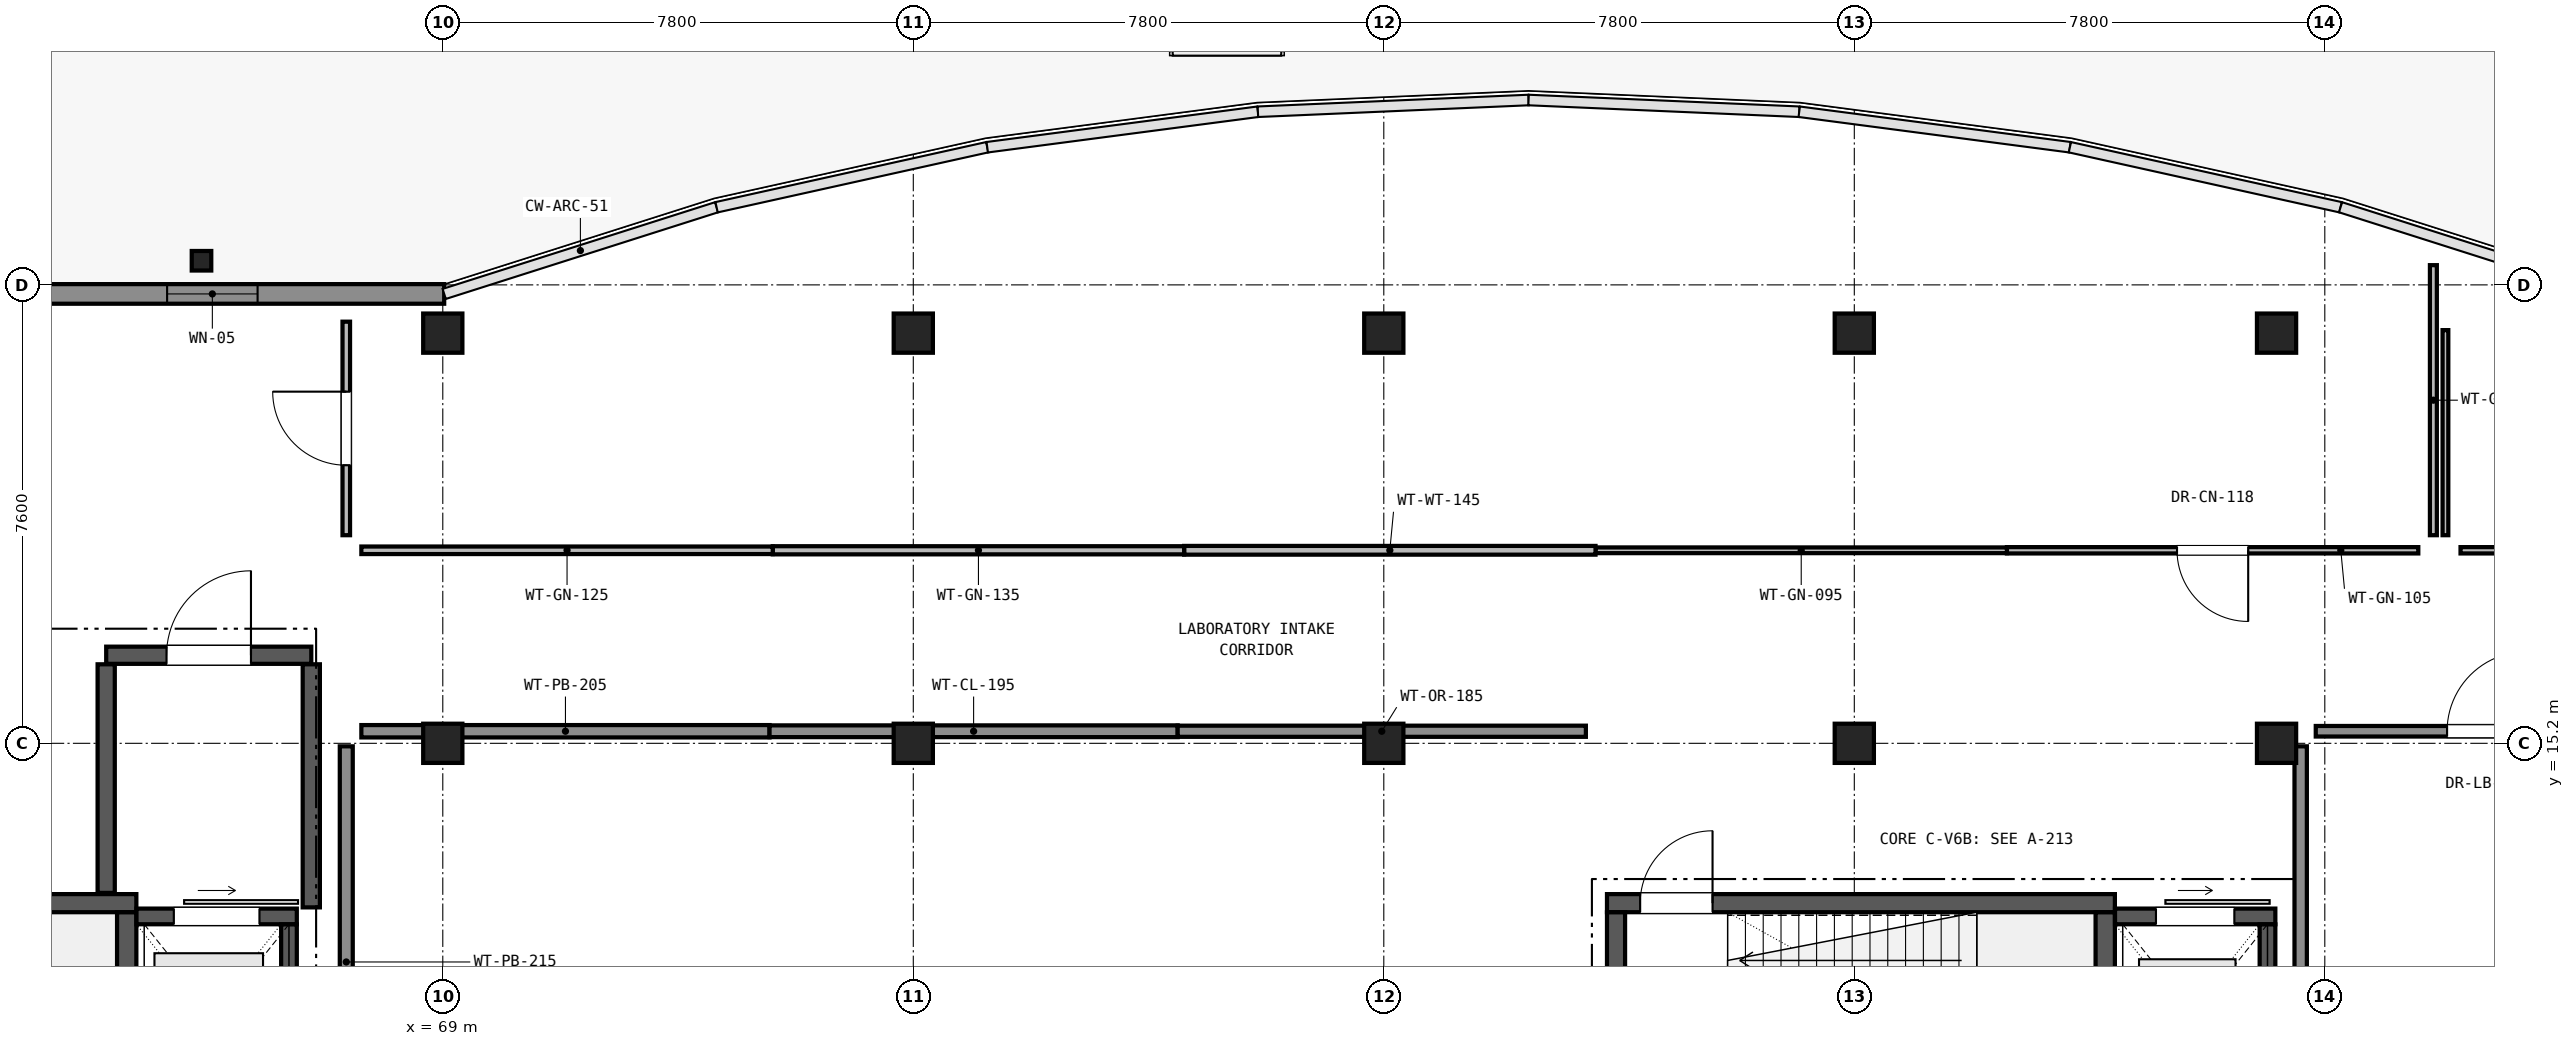
"""IFC4 building model, lengths in metres.
Left out: names, types, materials, properties, quantities, classifications, styles, units other than length and angle.
Written with IfcOpenShell. Run it as: python <this file> out.ifc"""

import sys

from ifc_helpers import new_model, si_unit, direction, frame, frame_2d, origin, origin_2d, place, context, subcontext, project, spatial, rectangle, hollow_circle, extrude, element, fill, save


model = new_model("IFC4")
c1 = context("Model", 3, precision=1e-05, world=origin(), true_north=direction((0.0, 1.0)))
c2 = subcontext(c1, "Body", "Model", "MODEL_VIEW")
j1 = project(units=[si_unit("LENGTHUNIT", "METRE"), si_unit("PLANEANGLEUNIT", "RADIAN")], contexts=[c1])
p1 = place(None, origin())
s1 = spatial("IfcSite", under=j1, at=p1, CompositionType="ELEMENT")
p2 = place(p1, origin())
s2 = spatial("IfcBuilding", under=s1, at=p2, CompositionType="ELEMENT")
p3 = place(p2, origin())
s3 = spatial("IfcBuildingStorey", under=s2, at=p3, CompositionType="ELEMENT", Elevation=0.0)
for number, where, z_axis, x_axis in (
    (1, (69.0, 15.2, 0.0), (0.0, 0.0, 1.0), (1.0, 0.0, 0.0)),
    (2, (69.0, 22.0, 0.0), (0.0, 0.0, 1.0), (1.0, 0.0, 0.0)),
    (3, (76.8, 15.2, 0.0), (0.0, 0.0, 1.0), (1.0, 0.0, 0.0)),
    (4, (76.8, 22.0, 0.0), (0.0, 0.0, 1.0), (1.0, 0.0, 0.0)),
    (5, (84.6, 15.2, 0.0), (0.0, 0.0, 1.0), (1.0, 0.0, 0.0)),
    (6, (84.6, 22.0, 0.0), (0.0, 0.0, 1.0), (1.0, 0.0, 0.0)),
    (7, (92.4, 15.2, 0.0), (0.0, 0.0, 1.0), (1.0, 0.0, 0.0)),
    (8, (92.4, 22.0, 0.0), (0.0, 0.0, 1.0), (1.0, 0.0, 0.0)),
    (9, (99.4, 15.2, 0.0), (0.0, 0.0, 1.0), (1.0, 0.0, 0.0)),
    (10, (99.4, 22.0, 0.0), (0.0, 0.0, 1.0), (1.0, 0.0, 0.0)),
):
    element("IfcColumn", number, at=place(p3, frame(where, z_axis=z_axis, x_axis=x_axis)), inside=s3, PredefinedType="COLUMN", context=c2, shape_type="SweptSolid", body=[
        extrude(rectangle(XDim=0.65, YDim=0.65, at=origin_2d()), origin(), (0.0, 0.0, 1.0), 5.1),
    ])
p4 = place(p3, frame((65.0, 23.2, 0.0), z_axis=(0.0, 0.0, 1.0), x_axis=(1.0, 0.0, 0.0)))
e11 = element("IfcColumn", 11, at=p4, inside=s3, PredefinedType="COLUMN", context=c2, shape_type="SweptSolid", body=[
    extrude(hollow_circle(Radius=0.162, WallThickness=0.012, at=origin_2d()), origin(), (0.0, 0.0, 1.0), 5.1),
])
p5 = place(p3, frame((61.337, 22.65, 0.0), z_axis=(0.0, 0.0, 1.0), x_axis=(1.0, 0.0, 0.0)))
e12 = element("IfcWall", 12, at=p5, inside=s3, PredefinedType="SOLIDWALL", context=c2, shape_type="SweptSolid", body=[
    extrude(rectangle(XDim=7.687, YDim=0.325, at=frame_2d((3.843, 0.0))), origin(), (0.0, 0.0, 1.0), 4.77),
])
p6 = place(p5, frame((3.093, 0.0, 0.9)))
e13 = element("IfcOpeningElement", 13, at=p6, cuts=e12, PredefinedType="OPENING", context=c2, shape_type="SweptSolid", body=[
    extrude(rectangle(XDim=1.5, YDim=1.5, at=frame_2d((0.75, 0.75))), frame((0.0, 0.172, 0.0), z_axis=(0.0, -1.0, 0.0), x_axis=(1.0, 0.0, 0.0)), (0.0, 0.0, 1.0), 0.345),
])
p7 = place(p3, frame((55.5, 12.55, 0.0), z_axis=(0.0, 0.0, 1.0), x_axis=(1.0, 0.0, 0.0)))
e14 = element("IfcWall", 14, at=p7, inside=s3, PredefinedType="SHEAR", context=c2, shape_type="SweptSolid", body=[
    extrude(rectangle(XDim=8.42, YDim=0.3, at=frame_2d((4.21, 0.0))), origin(), (0.0, 0.0, 1.0), 4.77),
])
p8 = place(p7, frame((0.55, 0.0, 0.0)))
e15 = element("IfcOpeningElement", 15, at=p8, cuts=e14, PredefinedType="OPENING", context=c2, shape_type="SweptSolid", body=[
    extrude(rectangle(XDim=1.2, YDim=2.2, at=frame_2d((0.6, 1.1))), frame((0.0, 0.16, 0.0), z_axis=(0.0, -1.0, 0.0), x_axis=(1.0, 0.0, 0.0)), (0.0, 0.0, 1.0), 0.32),
])
p9 = place(p3, frame((63.76, 9.002, 0.0), z_axis=(0.0, 0.0, 1.0), x_axis=(0.0, 1.0, 0.0)))
e16 = element("IfcWall", 16, at=p9, inside=s3, PredefinedType="SHEAR", context=c2, shape_type="SweptSolid", body=[
    extrude(rectangle(XDim=3.396, YDim=0.32, at=frame_2d((1.698, 0.0))), origin(), (0.0, 0.0, 1.0), 4.77),
])
p10 = place(p3, frame((63.922, 12.33, 0.0), z_axis=(0.0, 0.0, 1.0), x_axis=(1.0, 0.0, 0.0)))
e17 = element("IfcWall", 17, at=p10, inside=s3, PredefinedType="SHEAR", context=c2, shape_type="SweptSolid", body=[
    extrude(rectangle(XDim=2.658, YDim=0.26, at=frame_2d((1.329, 0.0))), origin(), (0.0, 0.0, 1.0), 4.77),
])
p11 = place(p10, frame((0.619, 0.0, 0.0)))
e18 = element("IfcOpeningElement", 18, at=p11, cuts=e17, PredefinedType="OPENING", context=c2, shape_type="SweptSolid", body=[
    extrude(rectangle(XDim=1.42, YDim=2.25, at=frame_2d((0.71, 1.125))), frame((0.0, 0.14, 0.0), z_axis=(0.0, -1.0, 0.0), x_axis=(1.0, 0.0, 0.0)), (0.0, 0.0, 1.0), 0.28),
])
p12 = place(p3, frame((66.45, 9.202, 0.0), z_axis=(0.0, 0.0, 1.0), x_axis=(0.0, 1.0, 0.0)))
e19 = element("IfcWall", 19, at=p12, inside=s3, PredefinedType="SHEAR", context=c2, shape_type="SweptSolid", body=[
    extrude(rectangle(XDim=2.996, YDim=0.26, at=frame_2d((1.498, 0.0))), origin(), (0.0, 0.0, 1.0), 4.77),
])
p13 = place(p3, frame((63.42, 16.66, 0.0), z_axis=(0.0, 0.0, 1.0), x_axis=(1.0, 0.0, 0.0)))
e20 = element("IfcWall", 20, at=p13, inside=s3, PredefinedType="SHEAR", context=c2, shape_type="SweptSolid", body=[
    extrude(rectangle(XDim=3.4, YDim=0.285, at=frame_2d((1.7, 0.0))), origin(), (0.0, 0.0, 1.0), 4.77),
])
p14 = place(p13, frame((1.0, 0.0, 0.0)))
e21 = element("IfcOpeningElement", 21, at=p14, cuts=e20, PredefinedType="OPENING", context=c2, shape_type="SweptSolid", body=[
    extrude(rectangle(XDim=1.4, YDim=2.25, at=frame_2d((0.7, 1.125))), frame((0.0, 0.152, 0.0), z_axis=(0.0, -1.0, 0.0), x_axis=(1.0, 0.0, 0.0)), (0.0, 0.0, 1.0), 0.305),
])
p15 = place(p3, frame((63.42, 12.72, 0.0), z_axis=(0.0, 0.0, 1.0), x_axis=(0.0, 1.0, 0.0)))
e22 = element("IfcWall", 22, at=p15, inside=s3, PredefinedType="SHEAR", context=c2, shape_type="SweptSolid", body=[
    extrude(rectangle(XDim=3.79, YDim=0.285, at=frame_2d((1.895, 0.0))), origin(), (0.0, 0.0, 1.0), 4.22),
])
p16 = place(p3, frame((66.82, 12.48, 0.0), z_axis=(0.0, 0.0, 1.0), x_axis=(0.0, 1.0, 0.0)))
e23 = element("IfcWall", 23, at=p16, inside=s3, PredefinedType="SHEAR", context=c2, shape_type="SweptSolid", body=[
    extrude(rectangle(XDim=4.03, YDim=0.285, at=frame_2d((2.015, 0.0))), origin(), (0.0, 0.0, 1.0), 4.22),
])
p17 = place(p3, frame((88.3, 12.55, 0.0), z_axis=(0.0, 0.0, 1.0), x_axis=(1.0, 0.0, 0.0)))
e24 = element("IfcWall", 24, at=p17, inside=s3, PredefinedType="SHEAR", context=c2, shape_type="SweptSolid", body=[
    extrude(rectangle(XDim=8.42, YDim=0.3, at=frame_2d((4.21, 0.0))), origin(), (0.0, 0.0, 1.0), 4.77),
])
p18 = place(p17, frame((0.55, 0.0, 0.0)))
e25 = element("IfcOpeningElement", 25, at=p18, cuts=e24, PredefinedType="OPENING", context=c2, shape_type="SweptSolid", body=[
    extrude(rectangle(XDim=1.2, YDim=2.2, at=frame_2d((0.6, 1.1))), frame((0.0, 0.16, 0.0), z_axis=(0.0, -1.0, 0.0), x_axis=(1.0, 0.0, 0.0)), (0.0, 0.0, 1.0), 0.32),
])
p19 = place(p3, frame((88.45, 9.002, 0.0), z_axis=(0.0, 0.0, 1.0), x_axis=(0.0, 1.0, 0.0)))
e26 = element("IfcWall", 26, at=p19, inside=s3, PredefinedType="SHEAR", context=c2, shape_type="SweptSolid", body=[
    extrude(rectangle(XDim=3.396, YDim=0.3, at=frame_2d((1.698, 0.0))), origin(), (0.0, 0.0, 1.0), 4.77),
])
p20 = place(p3, frame((96.56, 9.002, 0.0), z_axis=(0.0, 0.0, 1.0), x_axis=(0.0, 1.0, 0.0)))
e27 = element("IfcWall", 27, at=p20, inside=s3, PredefinedType="SHEAR", context=c2, shape_type="SweptSolid", body=[
    extrude(rectangle(XDim=3.396, YDim=0.32, at=frame_2d((1.698, 0.0))), origin(), (0.0, 0.0, 1.0), 4.77),
])
p21 = place(p3, frame((96.722, 12.33, 0.0), z_axis=(0.0, 0.0, 1.0), x_axis=(1.0, 0.0, 0.0)))
e28 = element("IfcWall", 28, at=p21, inside=s3, PredefinedType="SHEAR", context=c2, shape_type="SweptSolid", body=[
    extrude(rectangle(XDim=2.658, YDim=0.26, at=frame_2d((1.329, 0.0))), origin(), (0.0, 0.0, 1.0), 4.77),
])
p22 = place(p21, frame((0.679, 0.0, 0.0)))
e29 = element("IfcOpeningElement", 29, at=p22, cuts=e28, PredefinedType="OPENING", context=c2, shape_type="SweptSolid", body=[
    extrude(rectangle(XDim=1.3, YDim=2.2, at=frame_2d((0.65, 1.1))), frame((0.0, 0.14, 0.0), z_axis=(0.0, -1.0, 0.0), x_axis=(1.0, 0.0, 0.0)), (0.0, 0.0, 1.0), 0.28),
])
p23 = place(p3, frame((99.25, 9.202, 0.0), z_axis=(0.0, 0.0, 1.0), x_axis=(0.0, 1.0, 0.0)))
e30 = element("IfcWall", 30, at=p23, inside=s3, PredefinedType="SHEAR", context=c2, shape_type="SweptSolid", body=[
    extrude(rectangle(XDim=2.996, YDim=0.26, at=frame_2d((1.498, 0.0))), origin(), (0.0, 0.0, 1.0), 4.77),
])
p24 = place(p3, frame((67.4, 8.0, 0.0), z_axis=(0.0, 0.0, 1.0), x_axis=(0.0, 1.0, 0.0)))
e31 = element("IfcWall", 31, at=p24, inside=s3, PredefinedType="PARTITIONING", context=c2, shape_type="SweptSolid", body=[
    extrude(rectangle(XDim=7.15, YDim=0.215, at=frame_2d((3.575, 0.0))), origin(), (0.0, 0.0, 1.0), 4.07),
])
p25 = place(p3, frame((67.65, 15.4, 0.0), z_axis=(0.0, 0.0, 1.0), x_axis=(1.0, 0.0, 0.0)))
e32 = element("IfcWall", 32, at=p25, inside=s3, PredefinedType="PARTITIONING", context=c2, shape_type="SweptSolid", body=[
    extrude(rectangle(XDim=6.767, YDim=0.205, at=frame_2d((3.384, 0.0))), origin(), (0.0, 0.0, 1.0), 4.12),
])
p26 = place(p3, frame((74.417, 15.4, 0.0), z_axis=(0.0, 0.0, 1.0), x_axis=(1.0, 0.0, 0.0)))
e33 = element("IfcWall", 33, at=p26, inside=s3, PredefinedType="PARTITIONING", context=c2, shape_type="SweptSolid", body=[
    extrude(rectangle(XDim=6.766, YDim=0.195, at=frame_2d((3.383, 0.0))), origin(), (0.0, 0.0, 1.0), 3.97),
])
p27 = place(p3, frame((81.183, 15.4, 0.0), z_axis=(0.0, 0.0, 1.0), x_axis=(1.0, 0.0, 0.0)))
e34 = element("IfcWall", 34, at=p27, inside=s3, PredefinedType="PARTITIONING", context=c2, shape_type="SweptSolid", body=[
    extrude(rectangle(XDim=6.767, YDim=0.185, at=frame_2d((3.383, 0.0))), origin(), (0.0, 0.0, 1.0), 4.07),
])
p28 = place(p3, frame((67.4, 18.65, 0.0), z_axis=(0.0, 0.0, 1.0), x_axis=(0.0, 1.0, 0.0)))
e35 = element("IfcWall", 35, at=p28, inside=s3, PredefinedType="PARTITIONING", context=c2, shape_type="SweptSolid", body=[
    extrude(rectangle(XDim=3.54, YDim=0.125, at=frame_2d((1.77, 0.0))), origin(), (0.0, 0.0, 1.0), 4.07),
])
p29 = place(p28, frame((1.16, 0.0, 0.0)))
e36 = element("IfcOpeningElement", 36, at=p29, cuts=e35, PredefinedType="OPENING", context=c2, shape_type="SweptSolid", body=[
    extrude(rectangle(XDim=1.22, YDim=2.2, at=frame_2d((0.61, 1.1))), frame((0.0, 0.073, 0.0), z_axis=(0.0, -1.0, 0.0), x_axis=(1.0, 0.0, 0.0)), (0.0, 0.0, 1.0), 0.145),
])
p30 = place(p3, frame((102.0, 23.127, 0.0), z_axis=(0.0, 0.0, 1.0), x_axis=(0.0, -1.0, 0.0)))
e37 = element("IfcWall", 37, at=p30, inside=s3, PredefinedType="PARTITIONING", context=c2, shape_type="SweptSolid", body=[
    extrude(rectangle(XDim=4.477, YDim=0.115, at=frame_2d((2.239, 0.0))), origin(), (0.0, 0.0, 1.0), 4.12),
])
p31 = place(p3, frame((101.75, 18.4, 0.0), z_axis=(0.0, 0.0, 1.0), x_axis=(-1.0, 0.0, 0.0)))
e38 = element("IfcWall", 38, at=p31, inside=s3, PredefinedType="PARTITIONING", context=c2, shape_type="SweptSolid", body=[
    extrude(rectangle(XDim=6.82, YDim=0.105, at=frame_2d((3.41, 0.0))), origin(), (0.0, 0.0, 1.0), 4.22),
])
p32 = place(p31, frame((2.82, 0.0, 0.0)))
e39 = element("IfcOpeningElement", 39, at=p32, cuts=e38, PredefinedType="OPENING", context=c2, shape_type="SweptSolid", body=[
    extrude(rectangle(XDim=1.18, YDim=2.2, at=frame_2d((0.59, 1.1))), frame((0.0, 0.062, 0.0), z_axis=(0.0, -1.0, 0.0), x_axis=(1.0, 0.0, 0.0)), (0.0, 0.0, 1.0), 0.125),
])
p33 = place(p3, frame((94.93, 18.4, 0.0), z_axis=(0.0, 0.0, 1.0), x_axis=(-1.0, 0.0, 0.0)))
e40 = element("IfcWall", 40, at=p33, inside=s3, PredefinedType="PARTITIONING", context=c2, shape_type="SweptSolid", body=[
    extrude(rectangle(XDim=6.82, YDim=0.095, at=frame_2d((3.41, 0.0))), origin(), (0.0, 0.0, 1.0), 4.02),
])
p34 = place(p3, frame((88.11, 18.4, 0.0), z_axis=(0.0, 0.0, 1.0), x_axis=(-1.0, 0.0, 0.0)))
e41 = element("IfcWall", 41, at=p34, inside=s3, PredefinedType="PARTITIONING", context=c2, shape_type="SweptSolid", body=[
    extrude(rectangle(XDim=6.82, YDim=0.145, at=frame_2d((3.41, 0.0))), origin(), (0.0, 0.0, 1.0), 4.12),
])
p35 = place(p3, frame((81.29, 18.4, 0.0), z_axis=(0.0, 0.0, 1.0), x_axis=(-1.0, 0.0, 0.0)))
e42 = element("IfcWall", 42, at=p35, inside=s3, PredefinedType="PARTITIONING", context=c2, shape_type="SweptSolid", body=[
    extrude(rectangle(XDim=6.82, YDim=0.135, at=frame_2d((3.41, 0.0))), origin(), (0.0, 0.0, 1.0), 3.97),
])
p36 = place(p3, frame((74.47, 18.4, 0.0), z_axis=(0.0, 0.0, 1.0), x_axis=(-1.0, 0.0, 0.0)))
e43 = element("IfcWall", 43, at=p36, inside=s3, PredefinedType="PARTITIONING", context=c2, shape_type="SweptSolid", body=[
    extrude(rectangle(XDim=6.82, YDim=0.125, at=frame_2d((3.41, 0.0))), origin(), (0.0, 0.0, 1.0), 4.12),
])
p37 = place(p3, frame((100.05, 15.4, 0.0), z_axis=(0.0, 0.0, 1.0), x_axis=(1.0, 0.0, 0.0)))
e44 = element("IfcWall", 44, at=p37, inside=s3, PredefinedType="PARTITIONING", context=c2, shape_type="SweptSolid", body=[
    extrude(rectangle(XDim=5.675, YDim=0.175, at=frame_2d((2.837, 0.0))), origin(), (0.0, 0.0, 1.0), 3.97),
])
p38 = place(p37, frame((2.177, 0.0, 0.0)))
e45 = element("IfcOpeningElement", 45, at=p38, cuts=e44, PredefinedType="OPENING", context=c2, shape_type="SweptSolid", body=[
    extrude(rectangle(XDim=1.32, YDim=2.2, at=frame_2d((0.66, 1.1))), frame((0.0, 0.097, 0.0), z_axis=(0.0, -1.0, 0.0), x_axis=(1.0, 0.0, 0.0)), (0.0, 0.0, 1.0), 0.195),
])
p39 = place(p3, frame((99.8, 8.0, 0.0), z_axis=(0.0, 0.0, 1.0), x_axis=(0.0, 1.0, 0.0)))
e46 = element("IfcWall", 46, at=p39, inside=s3, PredefinedType="PARTITIONING", context=c2, shape_type="SweptSolid", body=[
    extrude(rectangle(XDim=7.15, YDim=0.205, at=frame_2d((3.575, 0.0))), origin(), (0.0, 0.0, 1.0), 3.97),
])
p40 = place(p3, frame((111.75, 18.4, 0.0), z_axis=(0.0, 0.0, 1.0), x_axis=(-1.0, 0.0, 0.0)))
e47 = element("IfcWall", 47, at=p40, inside=s3, PredefinedType="PARTITIONING", context=c2, shape_type="SweptSolid", body=[
    extrude(rectangle(XDim=9.3, YDim=0.105, at=frame_2d((4.65, 0.0))), origin(), (0.0, 0.0, 1.0), 4.07),
])
p41 = place(p40, frame((4.175, 0.0, 0.0)))
e48 = element("IfcOpeningElement", 48, at=p41, cuts=e47, PredefinedType="OPENING", context=c2, shape_type="SweptSolid", body=[
    extrude(rectangle(XDim=0.95, YDim=2.15, at=frame_2d((0.475, 1.075))), frame((0.0, 0.062, 0.0), z_axis=(0.0, -1.0, 0.0), x_axis=(1.0, 0.0, 0.0)), (0.0, 0.0, 1.0), 0.125),
])
p42 = place(p3, frame((102.2, 18.65, 0.0), z_axis=(0.0, 0.0, 1.0), x_axis=(0.0, 1.0, 0.0)))
e49 = element("IfcWall", 49, at=p42, inside=s3, PredefinedType="PARTITIONING", context=c2, shape_type="SweptSolid", body=[
    extrude(rectangle(XDim=3.4, YDim=0.095, at=frame_2d((1.7, 0.0))), origin(), (0.0, 0.0, 1.0), 4.12),
])
p43 = place(p6, origin())
e50 = element("IfcWindow", 50, at=p43, inside=s3, PartitioningType="SINGLE_PANEL", PredefinedType="WINDOW", context=c2, shape_type="SweptSolid", body=[
    extrude(rectangle(XDim=1.5, YDim=1.5, at=frame_2d((0.75, 0.75))), frame((0.0, 0.03, 0.0), z_axis=(0.0, -1.0, 0.0), x_axis=(1.0, 0.0, 0.0)), (0.0, 0.0, 1.0), 0.06),
])
fill(e13, e50)
p44 = place(p11, origin())
e51 = element("IfcDoor", 51, at=p44, inside=s3, OperationType="SLIDING_TO_RIGHT", PredefinedType="DOOR", context=c2, shape_type="SweptSolid", body=[
    extrude(rectangle(XDim=1.42, YDim=2.25, at=frame_2d((0.71, 1.125))), frame((0.0, 0.025, 0.0), z_axis=(0.0, -1.0, 0.0), x_axis=(1.0, 0.0, 0.0)), (0.0, 0.0, 1.0), 0.05),
])
fill(e18, e51)
p45 = place(p14, origin())
e52 = element("IfcDoor", 52, at=p45, inside=s3, OperationType="SINGLE_SWING_RIGHT", PredefinedType="DOOR", context=c2, shape_type="SweptSolid", body=[
    extrude(rectangle(XDim=1.4, YDim=2.25, at=frame_2d((0.7, 1.125))), frame((0.0, 0.025, 0.0), z_axis=(0.0, -1.0, 0.0), x_axis=(1.0, 0.0, 0.0)), (0.0, 0.0, 1.0), 0.05),
])
fill(e21, e52)
p46 = place(p18, origin())
e53 = element("IfcDoor", 53, at=p46, inside=s3, OperationType="SINGLE_SWING_RIGHT", PredefinedType="DOOR", context=c2, shape_type="SweptSolid", body=[
    extrude(rectangle(XDim=1.2, YDim=2.2, at=frame_2d((0.6, 1.1))), frame((0.0, 0.025, 0.0), z_axis=(0.0, -1.0, 0.0), x_axis=(1.0, 0.0, 0.0)), (0.0, 0.0, 1.0), 0.05),
])
fill(e25, e53)
p47 = place(p22, origin())
e54 = element("IfcDoor", 54, at=p47, inside=s3, OperationType="SLIDING_TO_RIGHT", PredefinedType="DOOR", context=c2, shape_type="SweptSolid", body=[
    extrude(rectangle(XDim=1.3, YDim=2.2, at=frame_2d((0.65, 1.1))), frame((0.0, 0.025, 0.0), z_axis=(0.0, -1.0, 0.0), x_axis=(1.0, 0.0, 0.0)), (0.0, 0.0, 1.0), 0.05),
])
fill(e29, e54)
p48 = place(p29, origin())
e55 = element("IfcDoor", 55, at=p48, inside=s3, OperationType="SINGLE_SWING_RIGHT", PredefinedType="DOOR", context=c2, shape_type="SweptSolid", body=[
    extrude(rectangle(XDim=1.22, YDim=2.2, at=frame_2d((0.61, 1.1))), frame((0.0, 0.025, 0.0), z_axis=(0.0, -1.0, 0.0), x_axis=(1.0, 0.0, 0.0)), (0.0, 0.0, 1.0), 0.05),
])
fill(e36, e55)
p49 = place(p32, origin())
e56 = element("IfcDoor", 56, at=p49, inside=s3, OperationType="SINGLE_SWING_LEFT", PredefinedType="DOOR", context=c2, shape_type="SweptSolid", body=[
    extrude(rectangle(XDim=1.18, YDim=2.2, at=frame_2d((0.59, 1.1))), frame((0.0, 0.025, 0.0), z_axis=(0.0, -1.0, 0.0), x_axis=(1.0, 0.0, 0.0)), (0.0, 0.0, 1.0), 0.05),
])
fill(e39, e56)
p50 = place(p38, origin())
e57 = element("IfcDoor", 57, at=p50, inside=s3, OperationType="SINGLE_SWING_RIGHT", PredefinedType="DOOR", context=c2, shape_type="SweptSolid", body=[
    extrude(rectangle(XDim=1.32, YDim=2.2, at=frame_2d((0.66, 1.1))), frame((0.0, 0.025, 0.0), z_axis=(0.0, -1.0, 0.0), x_axis=(1.0, 0.0, 0.0)), (0.0, 0.0, 1.0), 0.05),
])
fill(e45, e57)
save(model, sys.argv[1])
